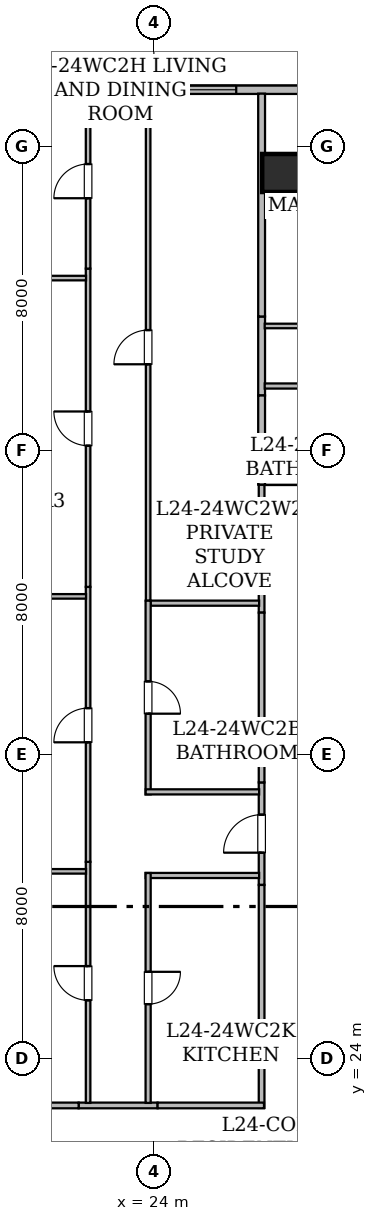
"""IFC4 building model, lengths in metres.
Left out: names, types, materials, properties, quantities, classifications, styles, units other than length and angle.
Written with IfcOpenShell. Run it as: python <this file> out.ifc"""

import sys

from ifc_helpers import new_model, si_unit, direction, frame, frame_2d, origin, origin_2d, place, context, subcontext, project, spatial, rectangle, hollow_rectangle, extrude, element, fill, save


model = new_model("IFC4")
c1 = context("Model", 3, precision=1e-05, world=origin(), true_north=direction((0.0, 1.0)))
c2 = subcontext(c1, "Body", "Model", "MODEL_VIEW")
j1 = project(units=[si_unit("LENGTHUNIT", "METRE"), si_unit("PLANEANGLEUNIT", "RADIAN")], contexts=[c1])
p1 = place(None, origin())
s1 = spatial("IfcSite", under=j1, at=p1, CompositionType="ELEMENT")
p2 = place(p1, origin())
s2 = spatial("IfcBuilding", under=s1, at=p2, CompositionType="ELEMENT")
p3 = place(p2, frame((0.0, 0.0, 98.25)))
s3 = spatial("IfcBuildingStorey", under=s2, at=p3, CompositionType="ELEMENT", Elevation=98.25)
p4 = place(p3, frame((27.35, 47.3, 0.0), z_axis=(0.0, 0.0, 1.0), x_axis=(1.0, 0.0, 0.0)))
e1 = element("IfcColumn", 1, at=p4, inside=s3, PredefinedType="COLUMN", context=c2, shape_type="SweptSolid", body=[
    extrude(hollow_rectangle(XDim=1.0, YDim=1.0, WallThickness=0.05, at=origin_2d()), origin(), (0.0, 0.0, 1.0), 3.65),
])
p5 = place(p3, frame((13.715, 49.49, 0.0), z_axis=(0.0, 0.0, 1.0), x_axis=(1.0, 0.0, 0.0)))
e2 = element("IfcWall", 2, at=p5, inside=s3, PredefinedType="STANDARD", context=c2, shape_type="SweptSolid", body=[
    extrude(rectangle(XDim=38.639, YDim=0.22, at=frame_2d((19.319, 0.0))), origin(), (0.0, 0.0, 1.0), 3.43),
])
p6 = place(p5, frame((1.435, 0.0, 0.85)))
e3 = element("IfcOpeningElement", 3, at=p6, cuts=e2, PredefinedType="OPENING", context=c2, shape_type="SweptSolid", body=[
    extrude(rectangle(XDim=1.65, YDim=1.55, at=frame_2d((0.825, 0.775))), frame((0.0, 0.12, 0.0), z_axis=(0.0, -1.0, 0.0), x_axis=(1.0, 0.0, 0.0)), (0.0, 0.0, 1.0), 0.24),
])
p7 = place(p5, frame((10.802, 0.0, 0.85)))
e4 = element("IfcOpeningElement", 4, at=p7, cuts=e2, PredefinedType="OPENING", context=c2, shape_type="SweptSolid", body=[
    extrude(rectangle(XDim=1.65, YDim=1.55, at=frame_2d((0.825, 0.775))), frame((0.0, 0.12, 0.0), z_axis=(0.0, -1.0, 0.0), x_axis=(1.0, 0.0, 0.0)), (0.0, 0.0, 1.0), 0.24),
])
p8 = place(p5, frame((8.744, 0.0, 0.8)))
e5 = element("IfcOpeningElement", 5, at=p8, cuts=e2, PredefinedType="OPENING", context=c2, shape_type="SweptSolid", body=[
    extrude(rectangle(XDim=1.2, YDim=1.5, at=frame_2d((0.6, 0.75))), frame((0.0, 0.12, 0.0), z_axis=(0.0, -1.0, 0.0), x_axis=(1.0, 0.0, 0.0)), (0.0, 0.0, 1.0), 0.24),
])
p9 = place(p5, frame((5.319, 0.0, 0.85)))
e6 = element("IfcOpeningElement", 6, at=p9, cuts=e2, PredefinedType="OPENING", context=c2, shape_type="SweptSolid", body=[
    extrude(rectangle(XDim=1.65, YDim=1.55, at=frame_2d((0.825, 0.775))), frame((0.0, 0.12, 0.0), z_axis=(0.0, -1.0, 0.0), x_axis=(1.0, 0.0, 0.0)), (0.0, 0.0, 1.0), 0.24),
])
p10 = place(p5, frame((15.556, 0.0, 0.85)))
e7 = element("IfcOpeningElement", 7, at=p10, cuts=e2, PredefinedType="OPENING", context=c2, shape_type="SweptSolid", body=[
    extrude(rectangle(XDim=1.65, YDim=1.55, at=frame_2d((0.825, 0.775))), frame((0.0, 0.12, 0.0), z_axis=(0.0, -1.0, 0.0), x_axis=(1.0, 0.0, 0.0)), (0.0, 0.0, 1.0), 0.24),
])
p11 = place(p5, frame((22.821, 0.0, 0.85)))
e8 = element("IfcOpeningElement", 8, at=p11, cuts=e2, PredefinedType="OPENING", context=c2, shape_type="SweptSolid", body=[
    extrude(rectangle(XDim=1.65, YDim=1.55, at=frame_2d((0.825, 0.775))), frame((0.0, 0.12, 0.0), z_axis=(0.0, -1.0, 0.0), x_axis=(1.0, 0.0, 0.0)), (0.0, 0.0, 1.0), 0.24),
])
p12 = place(p5, frame((30.23, 0.0, 0.85)))
e9 = element("IfcOpeningElement", 9, at=p12, cuts=e2, PredefinedType="OPENING", context=c2, shape_type="SweptSolid", body=[
    extrude(rectangle(XDim=1.65, YDim=1.55, at=frame_2d((0.825, 0.775))), frame((0.0, 0.12, 0.0), z_axis=(0.0, -1.0, 0.0), x_axis=(1.0, 0.0, 0.0)), (0.0, 0.0, 1.0), 0.24),
])
p13 = place(p5, frame((36.367, 0.0, 0.85)))
e10 = element("IfcOpeningElement", 10, at=p13, cuts=e2, PredefinedType="OPENING", context=c2, shape_type="SweptSolid", body=[
    extrude(rectangle(XDim=1.65, YDim=1.55, at=frame_2d((0.825, 0.775))), frame((0.0, 0.12, 0.0), z_axis=(0.0, -1.0, 0.0), x_axis=(1.0, 0.0, 0.0)), (0.0, 0.0, 1.0), 0.24),
])
p14 = place(p3, frame((26.835, 35.732, 0.0), z_axis=(0.0, 0.0, 1.0), x_axis=(0.0, 1.0, 0.0)))
e11 = element("IfcWall", 11, at=p14, inside=s3, PredefinedType="STANDARD", context=c2, shape_type="SweptSolid", body=[
    extrude(rectangle(XDim=3.368, YDim=0.15, at=frame_2d((1.684, 0.0))), origin(), (0.0, 0.0, 1.0), 2.647),
])
p15 = place(p3, frame((26.835, 28.567, 0.0), z_axis=(0.0, 0.0, 1.0), x_axis=(0.0, 1.0, 0.0)))
e12 = element("IfcWall", 12, at=p15, inside=s3, PredefinedType="STANDARD", context=c2, shape_type="SweptSolid", body=[
    extrude(rectangle(XDim=2.698, YDim=0.15, at=frame_2d((1.349, 0.0))), origin(), (0.0, 0.0, 1.0), 3.43),
])
p16 = place(p15, frame((0.849, 0.0, 0.0)))
e13 = element("IfcOpeningElement", 13, at=p16, cuts=e12, PredefinedType="OPENING", context=c2, shape_type="SweptSolid", body=[
    extrude(rectangle(XDim=1.0, YDim=2.15, at=frame_2d((0.5, 1.075))), frame((0.0, 0.085, 0.0), z_axis=(0.0, -1.0, 0.0), x_axis=(1.0, 0.0, 0.0)), (0.0, 0.0, 1.0), 0.17),
])
p17 = place(p3, frame((22.02, 22.765, 0.0), z_axis=(0.0, 0.0, 1.0), x_axis=(1.0, 0.0, 0.0)))
e14 = element("IfcWall", 14, at=p17, inside=s3, PredefinedType="STANDARD", context=c2, shape_type="SweptSolid", body=[
    extrude(rectangle(XDim=2.078, YDim=0.15, at=frame_2d((1.039, 0.0))), origin(), (0.0, 0.0, 1.0), 3.43),
])
p18 = place(p3, frame((26.835, 31.265, 0.0), z_axis=(0.0, 0.0, 1.0), x_axis=(0.0, 1.0, 0.0)))
e15 = element("IfcWall", 15, at=p18, inside=s3, PredefinedType="STANDARD", context=c2, shape_type="SweptSolid", body=[
    extrude(rectangle(XDim=4.467, YDim=0.15, at=frame_2d((2.233, 0.0))), origin(), (0.0, 0.0, 1.0), 3.43),
])
p19 = place(p3, frame((26.835, 22.7, 0.0), z_axis=(0.0, 0.0, 1.0), x_axis=(0.0, 1.0, 0.0)))
e16 = element("IfcWall", 16, at=p19, inside=s3, PredefinedType="STANDARD", context=c2, shape_type="SweptSolid", body=[
    extrude(rectangle(XDim=5.867, YDim=0.15, at=frame_2d((2.934, 0.0))), origin(), (0.0, 0.0, 1.0), 2.961),
])
p20 = place(p3, frame((24.098, 22.765, 0.0), z_axis=(0.0, 0.0, 1.0), x_axis=(1.0, 0.0, 0.0)))
e17 = element("IfcWall", 17, at=p20, inside=s3, PredefinedType="STANDARD", context=c2, shape_type="SweptSolid", body=[
    extrude(rectangle(XDim=2.8, YDim=0.15, at=frame_2d((1.4, 0.0))), origin(), (0.0, 0.0, 1.0), 3.43),
])
p21 = place(p3, frame((17.699, 22.765, 0.0), z_axis=(0.0, 0.0, 1.0), x_axis=(1.0, 0.0, 0.0)))
e18 = element("IfcWall", 18, at=p21, inside=s3, PredefinedType="STANDARD", context=c2, shape_type="SweptSolid", body=[
    extrude(rectangle(XDim=4.321, YDim=0.15, at=frame_2d((2.161, 0.0))), origin(), (0.0, 0.0, 1.0), 2.647),
])
p22 = place(p3, frame((26.9, 39.165, 0.0), z_axis=(0.0, 0.0, 1.0), x_axis=(1.0, 0.0, 0.0)))
e19 = element("IfcWall", 19, at=p22, inside=s3, PredefinedType="STANDARD", context=c2, shape_type="SweptSolid", body=[
    extrude(rectangle(XDim=4.701, YDim=0.15, at=frame_2d((2.351, 0.0))), origin(), (0.0, 0.0, 1.0), 2.647),
])
p23 = place(p3, frame((23.849, 36.046, 0.0), z_axis=(0.0, 0.0, 1.0), x_axis=(0.0, 1.0, 0.0)))
e20 = element("IfcWall", 20, at=p23, inside=s3, PredefinedType="PARTITIONING", context=c2, shape_type="SweptSolid", body=[
    extrude(rectangle(XDim=13.342, YDim=0.12, at=frame_2d((6.671, 0.0))), origin(), (0.0, 0.0, 1.0), 2.647),
])
p24 = place(p23, frame((6.221, 0.0, 0.0)))
e21 = element("IfcOpeningElement", 21, at=p24, cuts=e20, PredefinedType="OPENING", context=c2, shape_type="SweptSolid", body=[
    extrude(rectangle(XDim=0.9, YDim=2.1, at=frame_2d((0.45, 1.05))), frame((0.0, 0.07, 0.0), z_axis=(0.0, -1.0, 0.0), x_axis=(1.0, 0.0, 0.0)), (0.0, 0.0, 1.0), 0.14),
])
p25 = place(p3, frame((26.77, 35.981, 0.0), z_axis=(0.0, 0.0, 1.0), x_axis=(-1.0, 0.0, 0.0)))
e22 = element("IfcWall", 22, at=p25, inside=s3, PredefinedType="PARTITIONING", context=c2, shape_type="SweptSolid", body=[
    extrude(rectangle(XDim=2.856, YDim=0.135, at=frame_2d((1.428, 0.0))), origin(), (0.0, 0.0, 1.0), 3.43),
])
p26 = place(p3, frame((26.835, 43.524, 0.0), z_axis=(0.0, 0.0, 1.0), x_axis=(0.0, -1.0, 0.0)))
e23 = element("IfcWall", 23, at=p26, inside=s3, PredefinedType="STANDARD", context=c2, shape_type="SweptSolid", body=[
    extrude(rectangle(XDim=2.078, YDim=0.18, at=frame_2d((1.039, 0.0))), origin(), (0.0, 0.0, 1.0), 3.43),
])
p27 = place(p3, frame((26.835, 41.446, 0.0), z_axis=(0.0, 0.0, 1.0), x_axis=(0.0, -1.0, 0.0)))
e24 = element("IfcWall", 24, at=p27, inside=s3, PredefinedType="STANDARD", context=c2, shape_type="SweptSolid", body=[
    extrude(rectangle(XDim=2.346, YDim=0.18, at=frame_2d((1.173, 0.0))), origin(), (0.0, 0.0, 1.0), 3.43),
])
p28 = place(p3, frame((26.835, 49.388, 0.0), z_axis=(0.0, 0.0, 1.0), x_axis=(0.0, -1.0, 0.0)))
e25 = element("IfcWall", 25, at=p28, inside=s3, PredefinedType="STANDARD", context=c2, shape_type="SweptSolid", body=[
    extrude(rectangle(XDim=5.864, YDim=0.18, at=frame_2d((2.932, 0.0))), origin(), (0.0, 0.0, 1.0), 2.876),
])
p29 = place(p3, frame((23.849, 36.046, 0.0), z_axis=(0.0, 0.0, 1.0), x_axis=(0.0, -1.0, 0.0)))
e26 = element("IfcWall", 26, at=p29, inside=s3, PredefinedType="PARTITIONING", context=c2, shape_type="SweptSolid", body=[
    extrude(rectangle(XDim=5.095, YDim=0.135, at=frame_2d((2.547, 0.0))), origin(), (0.0, 0.0, 1.0), 3.43),
])
p30 = place(p29, frame((2.123, 0.0, 0.0)))
e27 = element("IfcOpeningElement", 27, at=p30, cuts=e26, PredefinedType="OPENING", context=c2, shape_type="SweptSolid", body=[
    extrude(rectangle(XDim=0.85, YDim=2.1, at=frame_2d((0.425, 1.05))), frame((0.0, 0.077, 0.0), z_axis=(0.0, -1.0, 0.0), x_axis=(1.0, 0.0, 0.0)), (0.0, 0.0, 1.0), 0.155),
])
for number, where, z_axis, x_axis in (
    (28, (23.784, 31.016, 0.0), (0.0, 0.0, 1.0), (1.0, 0.0, 0.0)),
    (29, (26.77, 28.816, 0.0), (0.0, 0.0, 1.0), (-1.0, 0.0, 0.0)),
):
    element("IfcWall", number, at=place(p3, frame(where, z_axis=z_axis, x_axis=x_axis)), inside=s3, PredefinedType="PARTITIONING", context=c2, shape_type="SweptSolid", body=[
        extrude(rectangle(XDim=2.986, YDim=0.135, at=frame_2d((1.493, 0.0))), origin(), (0.0, 0.0, 1.0), 3.43),
    ])
p31 = place(p3, frame((23.849, 28.881, 0.0), z_axis=(0.0, 0.0, 1.0), x_axis=(0.0, -1.0, 0.0)))
e30 = element("IfcWall", 30, at=p31, inside=s3, PredefinedType="PARTITIONING", context=c2, shape_type="SweptSolid", body=[
    extrude(rectangle(XDim=6.049, YDim=0.135, at=frame_2d((3.024, 0.0))), origin(), (0.0, 0.0, 1.0), 2.961),
])
p32 = place(p31, frame((2.6, 0.0, 0.0)))
e31 = element("IfcOpeningElement", 31, at=p32, cuts=e30, PredefinedType="OPENING", context=c2, shape_type="SweptSolid", body=[
    extrude(rectangle(XDim=0.85, YDim=2.1, at=frame_2d((0.425, 1.05))), frame((0.0, 0.077, 0.0), z_axis=(0.0, -1.0, 0.0), x_axis=(1.0, 0.0, 0.0)), (0.0, 0.0, 1.0), 0.155),
])
p33 = place(p3, frame((22.269, 22.832, 0.0), z_axis=(0.0, 0.0, 1.0), x_axis=(0.0, 1.0, 0.0)))
e32 = element("IfcWall", 32, at=p33, inside=s3, PredefinedType="PARTITIONING", context=c2, shape_type="SweptSolid", body=[
    extrude(rectangle(XDim=6.342, YDim=0.12, at=frame_2d((3.171, 0.0))), origin(), (0.0, 0.0, 1.0), 2.961),
])
p34 = place(p33, frame((2.7, 0.0, 0.0)))
e33 = element("IfcOpeningElement", 33, at=p34, cuts=e32, PredefinedType="OPENING", context=c2, shape_type="SweptSolid", body=[
    extrude(rectangle(XDim=0.9, YDim=2.1, at=frame_2d((0.45, 1.05))), frame((0.0, 0.07, 0.0), z_axis=(0.0, -1.0, 0.0), x_axis=(1.0, 0.0, 0.0)), (0.0, 0.0, 1.0), 0.14),
])
p35 = place(p3, frame((22.269, 29.174, 0.0), z_axis=(0.0, 0.0, 1.0), x_axis=(0.0, 1.0, 0.0)))
e34 = element("IfcWall", 34, at=p35, inside=s3, PredefinedType="PARTITIONING", context=c2, shape_type="SweptSolid", body=[
    extrude(rectangle(XDim=7.235, YDim=0.12, at=frame_2d((3.617, 0.0))), origin(), (0.0, 0.0, 1.0), 3.43),
])
p36 = place(p35, frame((3.146, 0.0, 0.0)))
e35 = element("IfcOpeningElement", 35, at=p36, cuts=e34, PredefinedType="OPENING", context=c2, shape_type="SweptSolid", body=[
    extrude(rectangle(XDim=0.9, YDim=2.1, at=frame_2d((0.45, 1.05))), frame((0.0, 0.07, 0.0), z_axis=(0.0, -1.0, 0.0), x_axis=(1.0, 0.0, 0.0)), (0.0, 0.0, 1.0), 0.14),
])
p37 = place(p3, frame((22.269, 36.409, 0.0), z_axis=(0.0, 0.0, 1.0), x_axis=(0.0, 1.0, 0.0)))
e36 = element("IfcWall", 36, at=p37, inside=s3, PredefinedType="PARTITIONING", context=c2, shape_type="SweptSolid", body=[
    extrude(rectangle(XDim=8.375, YDim=0.12, at=frame_2d((4.188, 0.0))), origin(), (0.0, 0.0, 1.0), 2.647),
])
p38 = place(p37, frame((3.716, 0.0, 0.0)))
e37 = element("IfcOpeningElement", 37, at=p38, cuts=e36, PredefinedType="OPENING", context=c2, shape_type="SweptSolid", body=[
    extrude(rectangle(XDim=0.9, YDim=2.1, at=frame_2d((0.45, 1.05))), frame((0.0, 0.07, 0.0), z_axis=(0.0, -1.0, 0.0), x_axis=(1.0, 0.0, 0.0)), (0.0, 0.0, 1.0), 0.14),
])
p39 = place(p3, frame((22.269, 44.784, 0.0), z_axis=(0.0, 0.0, 1.0), x_axis=(0.0, 1.0, 0.0)))
e38 = element("IfcWall", 38, at=p39, inside=s3, PredefinedType="PARTITIONING", context=c2, shape_type="SweptSolid", body=[
    extrude(rectangle(XDim=4.604, YDim=0.12, at=frame_2d((2.302, 0.0))), origin(), (0.0, 0.0, 1.0), 2.876),
])
p40 = place(p39, frame((1.852, 0.0, 0.0)))
e39 = element("IfcOpeningElement", 39, at=p40, cuts=e38, PredefinedType="OPENING", context=c2, shape_type="SweptSolid", body=[
    extrude(rectangle(XDim=0.9, YDim=2.1, at=frame_2d((0.45, 1.05))), frame((0.0, 0.07, 0.0), z_axis=(0.0, -1.0, 0.0), x_axis=(1.0, 0.0, 0.0)), (0.0, 0.0, 1.0), 0.14),
])
for number, where, z_axis, x_axis in (
    (40, (17.532, 28.925, 0.0), (0.0, 0.0, 1.0), (1.0, 0.0, 0.0)),
    (41, (17.532, 36.16, 0.0), (0.0, 0.0, 1.0), (1.0, 0.0, 0.0)),
):
    element("IfcWall", number, at=place(p3, frame(where, z_axis=z_axis, x_axis=x_axis)), inside=s3, PredefinedType="PARTITIONING", context=c2, shape_type="SweptSolid", body=[
        extrude(rectangle(XDim=4.683, YDim=0.12, at=frame_2d((2.342, 0.0))), origin(), (0.0, 0.0, 1.0), 2.647),
    ])
p41 = place(p3, frame((17.532, 44.535, 0.0), z_axis=(0.0, 0.0, 1.0), x_axis=(1.0, 0.0, 0.0)))
e42 = element("IfcWall", 42, at=p41, inside=s3, PredefinedType="PARTITIONING", context=c2, shape_type="SweptSolid", body=[
    extrude(rectangle(XDim=4.683, YDim=0.12, at=frame_2d((2.342, 0.0))), origin(), (0.0, 0.0, 1.0), 3.43),
])
p42 = place(p3, frame((31.915, 41.695, 0.0), z_axis=(0.0, 0.0, 1.0), x_axis=(-1.0, 0.0, 0.0)))
e43 = element("IfcWall", 43, at=p42, inside=s3, PredefinedType="PARTITIONING", context=c2, shape_type="SweptSolid", body=[
    extrude(rectangle(XDim=4.998, YDim=0.135, at=frame_2d((2.499, 0.0))), origin(), (0.0, 0.0, 1.0), 2.647),
])
p43 = place(p42, frame((2.074, 0.0, 0.0)))
e44 = element("IfcOpeningElement", 44, at=p43, cuts=e43, PredefinedType="OPENING", context=c2, shape_type="SweptSolid", body=[
    extrude(rectangle(XDim=0.85, YDim=2.1, at=frame_2d((0.425, 1.05))), frame((0.0, 0.077, 0.0), z_axis=(0.0, -1.0, 0.0), x_axis=(1.0, 0.0, 0.0)), (0.0, 0.0, 1.0), 0.155),
])
p44 = place(p3, frame((26.917, 43.275, 0.0), z_axis=(0.0, 0.0, 1.0), x_axis=(1.0, 0.0, 0.0)))
e45 = element("IfcWall", 45, at=p44, inside=s3, PredefinedType="PARTITIONING", context=c2, shape_type="SweptSolid", body=[
    extrude(rectangle(XDim=6.69, YDim=0.12, at=frame_2d((3.345, 0.0))), origin(), (0.0, 0.0, 1.0), 2.647),
])
p45 = place(p44, frame((2.873, 0.0, 0.0)))
e46 = element("IfcOpeningElement", 46, at=p45, cuts=e45, PredefinedType="OPENING", context=c2, shape_type="SweptSolid", body=[
    extrude(rectangle(XDim=0.9, YDim=2.1, at=frame_2d((0.45, 1.05))), frame((0.0, 0.07, 0.0), z_axis=(0.0, -1.0, 0.0), x_axis=(1.0, 0.0, 0.0)), (0.0, 0.0, 1.0), 0.14),
])
p46 = place(p7, origin())
e47 = element("IfcWindow", 47, at=p46, inside=s3, PartitioningType="SINGLE_PANEL", PredefinedType="WINDOW", context=c2, shape_type="SweptSolid", body=[
    extrude(rectangle(XDim=1.65, YDim=1.55, at=frame_2d((0.825, 0.775))), frame((0.0, 0.03, 0.0), z_axis=(0.0, -1.0, 0.0), x_axis=(1.0, 0.0, 0.0)), (0.0, 0.0, 1.0), 0.06),
])
fill(e4, e47)
p47 = place(p8, origin())
e48 = element("IfcWindow", 48, at=p47, inside=s3, PartitioningType="SINGLE_PANEL", PredefinedType="WINDOW", context=c2, shape_type="SweptSolid", body=[
    extrude(rectangle(XDim=1.2, YDim=1.5, at=frame_2d((0.6, 0.75))), frame((0.0, 0.03, 0.0), z_axis=(0.0, -1.0, 0.0), x_axis=(1.0, 0.0, 0.0)), (0.0, 0.0, 1.0), 0.06),
])
fill(e5, e48)
p48 = place(p16, origin())
e49 = element("IfcDoor", 49, at=p48, inside=s3, OperationType="SINGLE_SWING_LEFT", PredefinedType="DOOR", context=c2, shape_type="SweptSolid", body=[
    extrude(rectangle(XDim=1.0, YDim=2.15, at=frame_2d((0.5, 1.075))), frame((0.0, 0.025, 0.0), z_axis=(0.0, -1.0, 0.0), x_axis=(1.0, 0.0, 0.0)), (0.0, 0.0, 1.0), 0.05),
])
fill(e13, e49)
p49 = place(p24, origin())
e50 = element("IfcDoor", 50, at=p49, inside=s3, OperationType="SINGLE_SWING_LEFT", PredefinedType="DOOR", context=c2, shape_type="SweptSolid", body=[
    extrude(rectangle(XDim=0.9, YDim=2.1, at=frame_2d((0.45, 1.05))), frame((0.0, 0.025, 0.0), z_axis=(0.0, -1.0, 0.0), x_axis=(1.0, 0.0, 0.0)), (0.0, 0.0, 1.0), 0.05),
])
fill(e21, e50)
p50 = place(p30, origin())
e51 = element("IfcDoor", 51, at=p50, inside=s3, OperationType="SINGLE_SWING_RIGHT", PredefinedType="DOOR", context=c2, shape_type="SweptSolid", body=[
    extrude(rectangle(XDim=0.85, YDim=2.1, at=frame_2d((0.425, 1.05))), frame((0.0, 0.025, 0.0), z_axis=(0.0, -1.0, 0.0), x_axis=(1.0, 0.0, 0.0)), (0.0, 0.0, 1.0), 0.05),
])
fill(e27, e51)
p51 = place(p32, origin())
e52 = element("IfcDoor", 52, at=p51, inside=s3, OperationType="SINGLE_SWING_LEFT", PredefinedType="DOOR", context=c2, shape_type="SweptSolid", body=[
    extrude(rectangle(XDim=0.85, YDim=2.1, at=frame_2d((0.425, 1.05))), frame((0.0, 0.025, 0.0), z_axis=(0.0, -1.0, 0.0), x_axis=(1.0, 0.0, 0.0)), (0.0, 0.0, 1.0), 0.05),
])
fill(e31, e52)
p52 = place(p34, origin())
e53 = element("IfcDoor", 53, at=p52, inside=s3, OperationType="SINGLE_SWING_RIGHT", PredefinedType="DOOR", context=c2, shape_type="SweptSolid", body=[
    extrude(rectangle(XDim=0.9, YDim=2.1, at=frame_2d((0.45, 1.05))), frame((0.0, 0.025, 0.0), z_axis=(0.0, -1.0, 0.0), x_axis=(1.0, 0.0, 0.0)), (0.0, 0.0, 1.0), 0.05),
])
fill(e33, e53)
p53 = place(p36, origin())
e54 = element("IfcDoor", 54, at=p53, inside=s3, OperationType="SINGLE_SWING_LEFT", PredefinedType="DOOR", context=c2, shape_type="SweptSolid", body=[
    extrude(rectangle(XDim=0.9, YDim=2.1, at=frame_2d((0.45, 1.05))), frame((0.0, 0.025, 0.0), z_axis=(0.0, -1.0, 0.0), x_axis=(1.0, 0.0, 0.0)), (0.0, 0.0, 1.0), 0.05),
])
fill(e35, e54)
p54 = place(p38, origin())
e55 = element("IfcDoor", 55, at=p54, inside=s3, OperationType="SINGLE_SWING_RIGHT", PredefinedType="DOOR", context=c2, shape_type="SweptSolid", body=[
    extrude(rectangle(XDim=0.9, YDim=2.1, at=frame_2d((0.45, 1.05))), frame((0.0, 0.025, 0.0), z_axis=(0.0, -1.0, 0.0), x_axis=(1.0, 0.0, 0.0)), (0.0, 0.0, 1.0), 0.05),
])
fill(e37, e55)
p55 = place(p40, origin())
e56 = element("IfcDoor", 56, at=p55, inside=s3, OperationType="SINGLE_SWING_LEFT", PredefinedType="DOOR", context=c2, shape_type="SweptSolid", body=[
    extrude(rectangle(XDim=0.9, YDim=2.1, at=frame_2d((0.45, 1.05))), frame((0.0, 0.025, 0.0), z_axis=(0.0, -1.0, 0.0), x_axis=(1.0, 0.0, 0.0)), (0.0, 0.0, 1.0), 0.05),
])
fill(e39, e56)
save(model, sys.argv[1])
